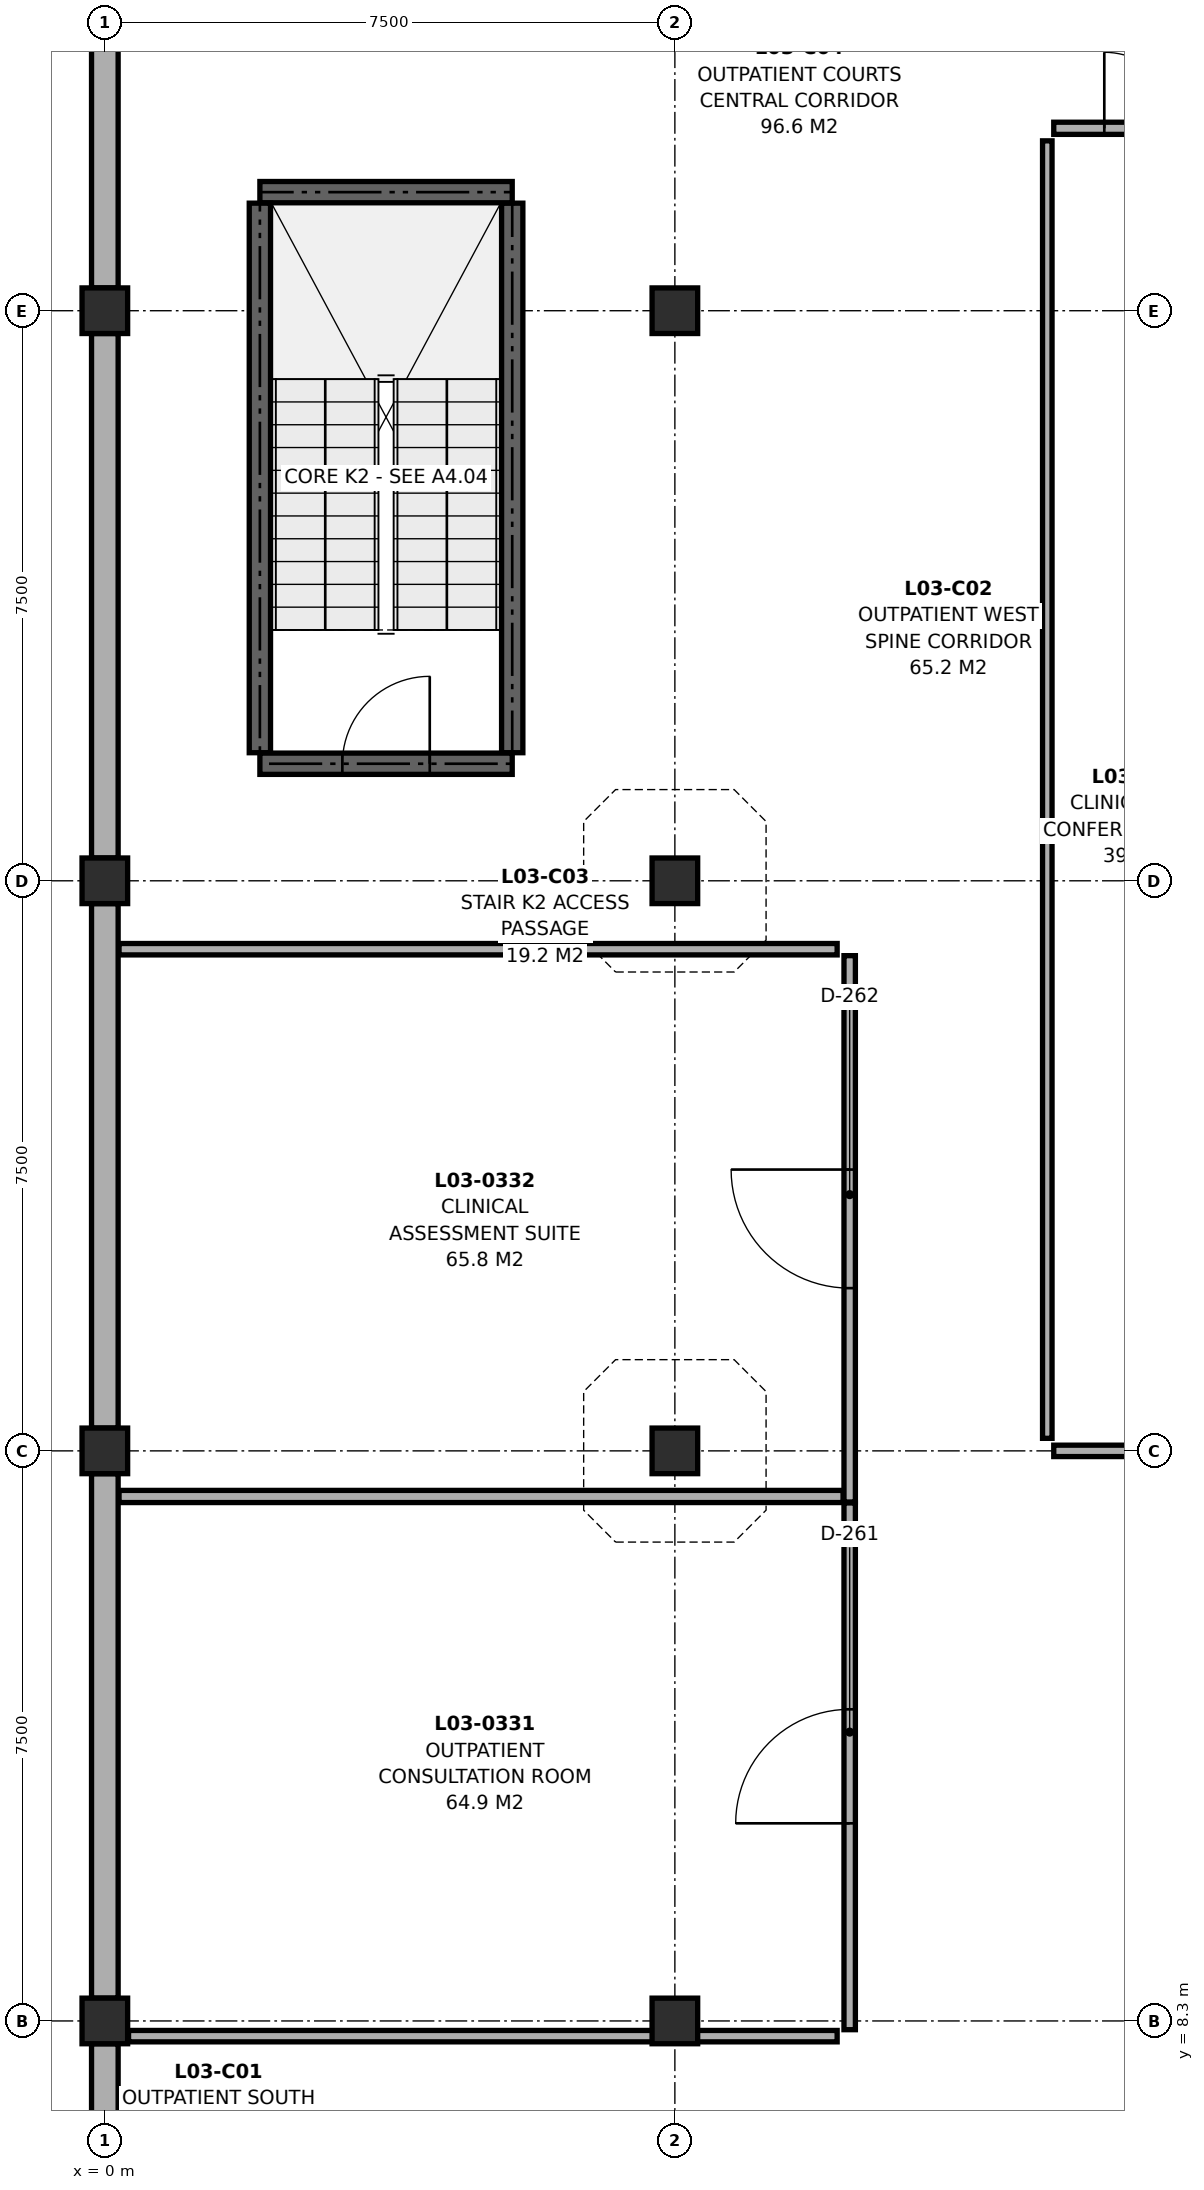
"""IFC4 building model, lengths in metres.
Left out: names, types, materials, properties, quantities, classifications, styles, units other than length and angle.
Written with IfcOpenShell. Run it as: python <this file> out.ifc"""

import sys

from ifc_helpers import new_model, si_unit, direction, frame, frame_2d, origin, origin_2d, place, context, subcontext, project, spatial, rectangle, extrude, element, fill, save


model = new_model("IFC4")
c1 = context("Model", 3, precision=1e-05, world=origin(), true_north=direction((0.0, 1.0)))
c2 = subcontext(c1, "Body", "Model", "MODEL_VIEW")
j1 = project(units=[si_unit("LENGTHUNIT", "METRE"), si_unit("PLANEANGLEUNIT", "RADIAN")], contexts=[c1])
p1 = place(None, origin())
s1 = spatial("IfcSite", under=j1, at=p1, CompositionType="ELEMENT")
p2 = place(p1, origin())
s2 = spatial("IfcBuilding", under=s1, at=p2, CompositionType="ELEMENT")
p3 = place(p2, frame((0.0, 0.0, 13.5)))
s3 = spatial("IfcBuildingStorey", under=s2, at=p3, CompositionType="ELEMENT", Elevation=13.5)
for number, where, z_axis, x_axis in (
    (1, (0.0, 8.3, 0.0), (0.0, 0.0, 1.0), (1.0, 0.0, 0.0)),
    (2, (0.0, 15.8, 0.0), (0.0, 0.0, 1.0), (1.0, 0.0, 0.0)),
    (3, (0.0, 23.3, 0.0), (0.0, 0.0, 1.0), (1.0, 0.0, 0.0)),
    (4, (0.0, 30.8, 0.0), (0.0, 0.0, 1.0), (1.0, 0.0, 0.0)),
    (5, (7.5, 8.3, 0.0), (0.0, 0.0, 1.0), (1.0, 0.0, 0.0)),
    (6, (7.5, 15.8, 0.0), (0.0, 0.0, 1.0), (1.0, 0.0, 0.0)),
    (7, (7.5, 23.3, 0.0), (0.0, 0.0, 1.0), (1.0, 0.0, 0.0)),
    (8, (7.5, 30.8, 0.0), (0.0, 0.0, 1.0), (1.0, 0.0, 0.0)),
):
    element("IfcColumn", number, at=place(p3, frame(where, z_axis=z_axis, x_axis=x_axis)), inside=s3, PredefinedType="COLUMN", context=c2, shape_type="SweptSolid", body=[
        extrude(rectangle(XDim=0.6, YDim=0.6, at=origin_2d()), origin(), (0.0, 0.0, 1.0), 3.72),
    ])
p4 = place(p3, frame((0.0, 1.1, 0.0), z_axis=(0.0, 0.0, 1.0), x_axis=(0.0, 1.0, 0.0)))
e9 = element("IfcWall", 9, at=p4, inside=s3, PredefinedType="SOLIDWALL", context=c2, shape_type="SweptSolid", body=[
    extrude(rectangle(XDim=6.9, YDim=0.35, at=frame_2d((3.45, 0.0))), origin(), (0.0, 0.0, 1.0), 3.005),
])
for number, where, z_axis, x_axis in (
    (10, (0.0, 8.6, 0.0), (0.0, 0.0, 1.0), (0.0, 1.0, 0.0)),
    (11, (0.0, 16.1, 0.0), (0.0, 0.0, 1.0), (0.0, 1.0, 0.0)),
    (12, (0.0, 23.6, 0.0), (0.0, 0.0, 1.0), (0.0, 1.0, 0.0)),
    (13, (0.0, 31.1, 0.0), (0.0, 0.0, 1.0), (0.0, 1.0, 0.0)),
):
    element("IfcWall", number, at=place(p3, frame(where, z_axis=z_axis, x_axis=x_axis)), inside=s3, PredefinedType="SOLIDWALL", context=c2, shape_type="SweptSolid", body=[
        extrude(rectangle(XDim=6.9, YDim=0.35, at=frame_2d((3.45, 0.0))), origin(), (0.0, 0.0, 1.0), 2.805),
    ])
p5 = place(p3, frame((5.36, 24.985, 0.0), z_axis=(0.0, 0.0, 1.0), x_axis=(0.0, 1.0, 0.0)))
e14 = element("IfcWall", 14, at=p5, inside=s3, PredefinedType="SHEAR", context=c2, shape_type="SweptSolid", body=[
    extrude(rectangle(XDim=7.23, YDim=0.28, at=frame_2d((3.615, 0.0))), origin(), (0.0, 0.0, 1.0), 3.72),
])
p6 = place(p3, frame((5.36, 32.36, 0.0), z_axis=(0.0, 0.0, 1.0), x_axis=(-1.0, 0.0, 0.0)))
e15 = element("IfcWall", 15, at=p6, inside=s3, PredefinedType="SHEAR", context=c2, shape_type="SweptSolid", body=[
    extrude(rectangle(XDim=3.32, YDim=0.28, at=frame_2d((1.66, 0.0))), origin(), (0.0, 0.0, 1.0), 3.72),
])
p7 = place(p3, frame((2.04, 32.215, 0.0), z_axis=(0.0, 0.0, 1.0), x_axis=(0.0, -1.0, 0.0)))
e16 = element("IfcWall", 16, at=p7, inside=s3, PredefinedType="SHEAR", context=c2, shape_type="SweptSolid", body=[
    extrude(rectangle(XDim=7.23, YDim=0.28, at=frame_2d((3.615, 0.0))), origin(), (0.0, 0.0, 1.0), 3.72),
])
p8 = place(p3, frame((2.04, 24.84, 0.0), z_axis=(0.0, 0.0, 1.0), x_axis=(1.0, 0.0, 0.0)))
e17 = element("IfcWall", 17, at=p8, inside=s3, PredefinedType="SHEAR", context=c2, shape_type="SweptSolid", body=[
    extrude(rectangle(XDim=3.32, YDim=0.28, at=frame_2d((1.66, 0.0))), origin(), (0.0, 0.0, 1.0), 3.72),
])
p9 = place(p8, frame((1.085, 0.0, 0.0)))
e18 = element("IfcOpeningElement", 18, at=p9, cuts=e17, PredefinedType="OPENING", context=c2, shape_type="SweptSolid", body=[
    extrude(rectangle(XDim=1.15, YDim=2.15, at=frame_2d((0.575, 1.075))), frame((0.0, 0.152, 0.0), z_axis=(0.0, -1.0, 0.0), x_axis=(1.0, 0.0, 0.0)), (0.0, 0.0, 1.0), 0.304),
])
p10 = place(p3, frame((9.8, 8.185, 0.0), z_axis=(0.0, 0.0, 1.0), x_axis=(0.0, 1.0, 0.0)))
e19 = element("IfcWall", 19, at=p10, inside=s3, PredefinedType="PARTITIONING", context=c2, shape_type="SweptSolid", body=[
    extrude(rectangle(XDim=6.93, YDim=0.15, at=frame_2d((3.465, 0.0))), origin(), (0.0, 0.0, 1.0), 2.805),
])
p11 = place(p10, frame((2.715, 0.0, 0.0)))
e20 = element("IfcOpeningElement", 20, at=p11, cuts=e19, PredefinedType="OPENING", context=c2, shape_type="SweptSolid", body=[
    extrude(rectangle(XDim=1.5, YDim=2.28, at=frame_2d((0.75, 1.14))), frame((0.0, 0.087, 0.0), z_axis=(0.0, -1.0, 0.0), x_axis=(1.0, 0.0, 0.0)), (0.0, 0.0, 1.0), 0.174),
])
p12 = place(p3, frame((9.8, 15.127, 0.0), z_axis=(0.0, 0.0, 1.0), x_axis=(0.0, 1.0, 0.0)))
e21 = element("IfcWall", 21, at=p12, inside=s3, PredefinedType="PARTITIONING", context=c2, shape_type="SweptSolid", body=[
    extrude(rectangle(XDim=7.188, YDim=0.15, at=frame_2d((3.594, 0.0))), origin(), (0.0, 0.0, 1.0), 2.805),
])
p13 = place(p12, frame((2.814, 0.0, 0.0)))
e22 = element("IfcOpeningElement", 22, at=p13, cuts=e21, PredefinedType="OPENING", context=c2, shape_type="SweptSolid", body=[
    extrude(rectangle(XDim=1.56, YDim=2.3, at=frame_2d((0.78, 1.15))), frame((0.0, 0.087, 0.0), z_axis=(0.0, -1.0, 0.0), x_axis=(1.0, 0.0, 0.0)), (0.0, 0.0, 1.0), 0.174),
])
p14 = place(p3, frame((12.485, 33.2, 0.0), z_axis=(0.0, 0.0, 1.0), x_axis=(1.0, 0.0, 0.0)))
e23 = element("IfcWall", 23, at=p14, inside=s3, PredefinedType="PARTITIONING", context=c2, shape_type="SweptSolid", body=[
    extrude(rectangle(XDim=2.33, YDim=0.16, at=frame_2d((1.165, 0.0))), origin(), (0.0, 0.0, 1.0), 2.805),
])
p15 = place(p14, frame((0.665, 0.0, 0.0)))
e24 = element("IfcOpeningElement", 24, at=p15, cuts=e23, PredefinedType="OPENING", context=c2, shape_type="SweptSolid", body=[
    extrude(rectangle(XDim=1.0, YDim=2.15, at=frame_2d((0.5, 1.075))), frame((0.0, 0.092, 0.0), z_axis=(0.0, -1.0, 0.0), x_axis=(1.0, 0.0, 0.0)), (0.0, 0.0, 1.0), 0.184),
])
p16 = place(p3, frame((12.485, 15.8, 0.0), z_axis=(0.0, 0.0, 1.0), x_axis=(1.0, 0.0, 0.0)))
e25 = element("IfcWall", 25, at=p16, inside=s3, PredefinedType="PARTITIONING", context=c2, shape_type="SweptSolid", body=[
    extrude(rectangle(XDim=2.203, YDim=0.15, at=frame_2d((1.102, 0.0))), origin(), (0.0, 0.0, 1.0), 2.805),
])
p17 = place(p3, frame((0.312, 8.1, 0.0), z_axis=(0.0, 0.0, 1.0), x_axis=(1.0, 0.0, 0.0)))
e26 = element("IfcWall", 26, at=p17, inside=s3, PredefinedType="PARTITIONING", context=c2, shape_type="SweptSolid", body=[
    extrude(rectangle(XDim=9.323, YDim=0.15, at=frame_2d((4.662, 0.0))), origin(), (0.0, 0.0, 1.0), 2.805),
])
p18 = place(p3, frame((0.187, 15.2, 0.0), z_axis=(0.0, 0.0, 1.0), x_axis=(1.0, 0.0, 0.0)))
e27 = element("IfcWall", 27, at=p18, inside=s3, PredefinedType="PARTITIONING", context=c2, shape_type="SweptSolid", body=[
    extrude(rectangle(XDim=9.526, YDim=0.16, at=frame_2d((4.763, 0.0))), origin(), (0.0, 0.0, 1.0), 2.805),
])
p19 = place(p3, frame((0.187, 22.4, 0.0), z_axis=(0.0, 0.0, 1.0), x_axis=(1.0, 0.0, 0.0)))
e28 = element("IfcWall", 28, at=p19, inside=s3, PredefinedType="PARTITIONING", context=c2, shape_type="SweptSolid", body=[
    extrude(rectangle(XDim=9.448, YDim=0.15, at=frame_2d((4.724, 0.0))), origin(), (0.0, 0.0, 1.0), 2.805),
])
p20 = place(p3, frame((12.4, 15.965, 0.0), z_axis=(0.0, 0.0, 1.0), x_axis=(0.0, 1.0, 0.0)))
e29 = element("IfcWall", 29, at=p20, inside=s3, PredefinedType="PARTITIONING", context=c2, shape_type="SweptSolid", body=[
    extrude(rectangle(XDim=17.07, YDim=0.125, at=frame_2d((8.535, 0.0))), origin(), (0.0, 0.0, 1.0), 2.805),
])
p21 = place(p9, origin())
e30 = element("IfcDoor", 30, at=p21, inside=s3, OperationType="SINGLE_SWING_RIGHT", PredefinedType="DOOR", context=c2, shape_type="SweptSolid", body=[
    extrude(rectangle(XDim=1.15, YDim=2.15, at=frame_2d((0.575, 1.075))), frame((0.0, 0.025, 0.0), z_axis=(0.0, -1.0, 0.0), x_axis=(1.0, 0.0, 0.0)), (0.0, 0.0, 1.0), 0.05),
])
fill(e18, e30)
p22 = place(p11, origin())
e31 = element("IfcDoor", 31, at=p22, inside=s3, OperationType="SINGLE_SWING_LEFT", PredefinedType="DOOR", context=c2, shape_type="SweptSolid", body=[
    extrude(rectangle(XDim=1.5, YDim=2.28, at=frame_2d((0.75, 1.14))), frame((0.0, 0.025, 0.0), z_axis=(0.0, -1.0, 0.0), x_axis=(1.0, 0.0, 0.0)), (0.0, 0.0, 1.0), 0.05),
])
fill(e20, e31)
p23 = place(p13, origin())
e32 = element("IfcDoor", 32, at=p23, inside=s3, OperationType="SINGLE_SWING_RIGHT", PredefinedType="DOOR", context=c2, shape_type="SweptSolid", body=[
    extrude(rectangle(XDim=1.56, YDim=2.3, at=frame_2d((0.78, 1.15))), frame((0.0, 0.025, 0.0), z_axis=(0.0, -1.0, 0.0), x_axis=(1.0, 0.0, 0.0)), (0.0, 0.0, 1.0), 0.05),
])
fill(e22, e32)
p24 = place(p15, origin())
e33 = element("IfcDoor", 33, at=p24, inside=s3, OperationType="SINGLE_SWING_LEFT", PredefinedType="DOOR", context=c2, shape_type="SweptSolid", body=[
    extrude(rectangle(XDim=1.0, YDim=2.15, at=frame_2d((0.5, 1.075))), frame((0.0, 0.025, 0.0), z_axis=(0.0, -1.0, 0.0), x_axis=(1.0, 0.0, 0.0)), (0.0, 0.0, 1.0), 0.05),
])
fill(e24, e33)
save(model, sys.argv[1])
